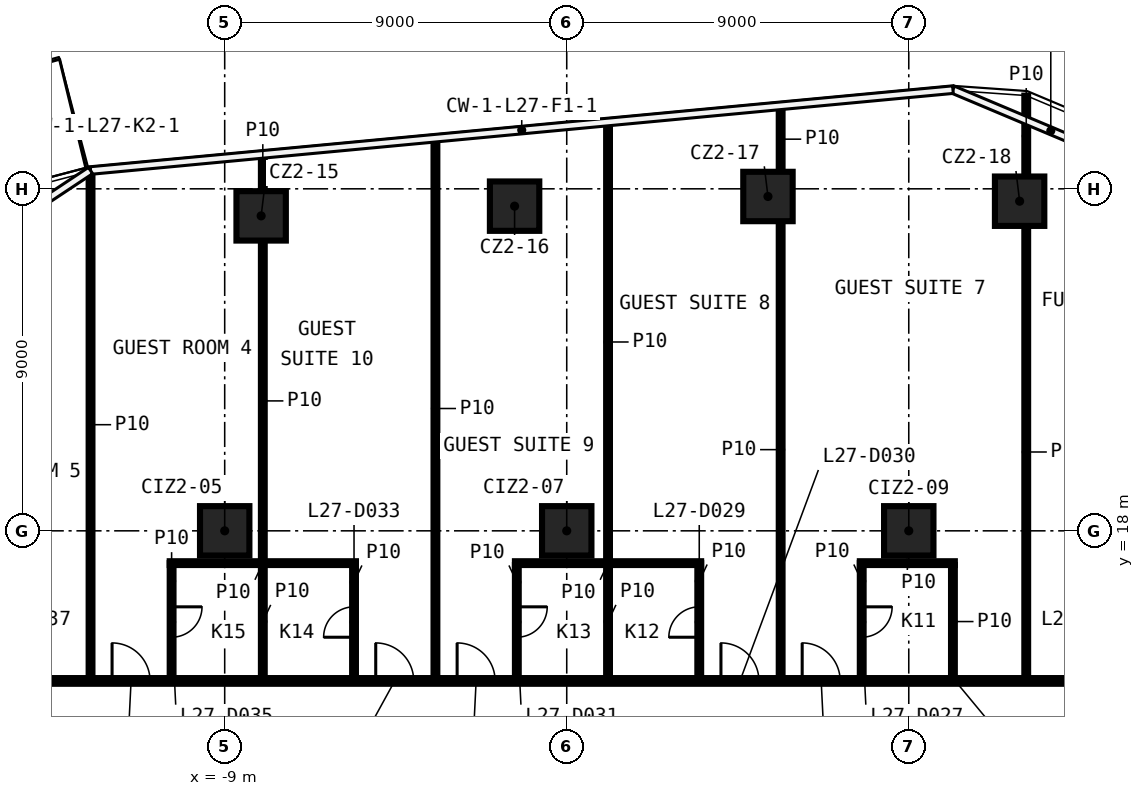
"""IFC4 building model, lengths in metres.
Left out: names, types, materials, properties, quantities, classifications, styles, units other than length and angle.
Written with IfcOpenShell. Run it as: python <this file> out.ifc"""

import sys

from ifc_helpers import new_model, si_unit, direction, frame, frame_2d, origin, origin_2d, place, context, subcontext, project, spatial, rectangle, extrude, element, fill, save


model = new_model("IFC4")
c1 = context("Model", 3, precision=1e-05, world=origin(), true_north=direction((0.0, 1.0)))
c2 = subcontext(c1, "Body", "Model", "MODEL_VIEW")
j1 = project(units=[si_unit("LENGTHUNIT", "METRE"), si_unit("PLANEANGLEUNIT", "RADIAN")], contexts=[c1])
p1 = place(None, origin())
s1 = spatial("IfcSite", under=j1, at=p1, CompositionType="ELEMENT")
p2 = place(p1, origin())
s2 = spatial("IfcBuilding", under=s1, at=p2, CompositionType="ELEMENT")
p3 = place(p2, frame((0.0, 0.0, 124.8)))
s3 = spatial("IfcBuildingStorey", under=s2, at=p3, CompositionType="ELEMENT", Elevation=124.8)
for number, where, z_axis, x_axis in (
    (1, (-8.041, 26.288, 0.0), (0.0, 0.0, 1.0), (1.0, 0.0, 0.0)),
    (2, (-1.372, 26.544, 0.0), (0.0, 0.0, 1.0), (1.0, 0.0, 0.0)),
    (3, (5.295, 26.798, 0.0), (0.0, 0.0, 1.0), (1.0, 0.0, 0.0)),
    (4, (11.917, 26.674, 0.0), (0.0, 0.0, 1.0), (1.0, 0.0, 0.0)),
    (5, (-9.0, 18.0, 0.0), (0.0, 0.0, 1.0), (1.0, 0.0, 0.0)),
    (6, (0.0, 18.0, 0.0), (0.0, 0.0, 1.0), (1.0, 0.0, 0.0)),
    (7, (9.0, 18.0, 0.0), (0.0, 0.0, 1.0), (1.0, 0.0, 0.0)),
):
    element("IfcColumn", number, at=place(p3, frame(where, z_axis=z_axis, x_axis=x_axis)), inside=s3, PredefinedType="COLUMN", context=c2, shape_type="SweptSolid", body=[
        extrude(rectangle(XDim=1.3, YDim=1.3, at=origin_2d()), origin(), (0.0, 0.0, 1.0), 3.3),
    ])
p4 = place(p3, frame((-17.125, 14.05, 0.0), z_axis=(0.0, 0.0, 1.0), x_axis=(1.0, 0.0, 0.0)))
e8 = element("IfcWall", 8, at=p4, inside=s3, PredefinedType="PARTITIONING", context=c2, shape_type="SweptSolid", body=[
    extrude(rectangle(XDim=34.25, YDim=0.15, at=frame_2d((17.125, 0.0))), origin(), (0.0, 0.0, 1.0), 3.3),
])
p5 = place(p4, frame((30.377, 0.0, 0.0)))
e9 = element("IfcOpeningElement", 9, at=p5, cuts=e8, PredefinedType="OPENING", context=c2, shape_type="SweptSolid", body=[
    extrude(rectangle(XDim=0.9, YDim=2.1, at=frame_2d((0.45, 1.05))), frame((0.0, 0.085, 0.0), z_axis=(0.0, -1.0, 0.0), x_axis=(1.0, 0.0, 0.0)), (0.0, 0.0, 1.0), 0.17),
])
p6 = place(p4, frame((23.321, 0.0, 0.0)))
e10 = element("IfcOpeningElement", 10, at=p6, cuts=e8, PredefinedType="OPENING", context=c2, shape_type="SweptSolid", body=[
    extrude(rectangle(XDim=1.0, YDim=2.1, at=frame_2d((0.5, 1.05))), frame((0.0, 0.085, 0.0), z_axis=(0.0, -1.0, 0.0), x_axis=(1.0, 0.0, 0.0)), (0.0, 0.0, 1.0), 0.17),
])
p7 = place(p4, frame((21.183, 0.0, 0.0)))
e11 = element("IfcOpeningElement", 11, at=p7, cuts=e8, PredefinedType="OPENING", context=c2, shape_type="SweptSolid", body=[
    extrude(rectangle(XDim=1.0, YDim=2.1, at=frame_2d((0.5, 1.05))), frame((0.0, 0.085, 0.0), z_axis=(0.0, -1.0, 0.0), x_axis=(1.0, 0.0, 0.0)), (0.0, 0.0, 1.0), 0.17),
])
p8 = place(p4, frame((14.241, 0.0, 0.0)))
e12 = element("IfcOpeningElement", 12, at=p8, cuts=e8, PredefinedType="OPENING", context=c2, shape_type="SweptSolid", body=[
    extrude(rectangle(XDim=1.0, YDim=2.1, at=frame_2d((0.5, 1.05))), frame((0.0, 0.085, 0.0), z_axis=(0.0, -1.0, 0.0), x_axis=(1.0, 0.0, 0.0)), (0.0, 0.0, 1.0), 0.17),
])
p9 = place(p4, frame((12.099, 0.0, 0.0)))
e13 = element("IfcOpeningElement", 13, at=p9, cuts=e8, PredefinedType="OPENING", context=c2, shape_type="SweptSolid", body=[
    extrude(rectangle(XDim=1.0, YDim=2.1, at=frame_2d((0.5, 1.05))), frame((0.0, 0.085, 0.0), z_axis=(0.0, -1.0, 0.0), x_axis=(1.0, 0.0, 0.0)), (0.0, 0.0, 1.0), 0.17),
])
p10 = place(p4, frame((5.161, 0.0, 0.0)))
e14 = element("IfcOpeningElement", 14, at=p10, cuts=e8, PredefinedType="OPENING", context=c2, shape_type="SweptSolid", body=[
    extrude(rectangle(XDim=1.0, YDim=2.1, at=frame_2d((0.5, 1.05))), frame((0.0, 0.085, 0.0), z_axis=(0.0, -1.0, 0.0), x_axis=(1.0, 0.0, 0.0)), (0.0, 0.0, 1.0), 0.17),
])
p11 = place(p4, frame((2.406, 0.0, 0.0)))
e15 = element("IfcOpeningElement", 15, at=p11, cuts=e8, PredefinedType="OPENING", context=c2, shape_type="SweptSolid", body=[
    extrude(rectangle(XDim=0.9, YDim=2.1, at=frame_2d((0.45, 1.05))), frame((0.0, 0.085, 0.0), z_axis=(0.0, -1.0, 0.0), x_axis=(1.0, 0.0, 0.0)), (0.0, 0.0, 1.0), 0.17),
])
p12 = place(p3, frame((-10.447, 17.15, 0.0), z_axis=(0.0, 0.0, 1.0), x_axis=(1.0, 0.0, 0.0)))
e16 = element("IfcWall", 16, at=p12, inside=s3, PredefinedType="PARTITIONING", context=c2, shape_type="SweptSolid", body=[
    extrude(rectangle(XDim=4.9, YDim=0.1, at=frame_2d((2.45, 0.0))), origin(), (0.0, 0.0, 1.0), 3.3),
])
p13 = place(p3, frame((-1.363, 17.15, 0.0), z_axis=(0.0, 0.0, 1.0), x_axis=(1.0, 0.0, 0.0)))
e17 = element("IfcWall", 17, at=p13, inside=s3, PredefinedType="PARTITIONING", context=c2, shape_type="SweptSolid", body=[
    extrude(rectangle(XDim=4.9, YDim=0.1, at=frame_2d((2.45, 0.0))), origin(), (0.0, 0.0, 1.0), 3.3),
])
p14 = place(p3, frame((7.712, 17.15, 0.0), z_axis=(0.0, 0.0, 1.0), x_axis=(1.0, 0.0, 0.0)))
e18 = element("IfcWall", 18, at=p14, inside=s3, PredefinedType="PARTITIONING", context=c2, shape_type="SweptSolid", body=[
    extrude(rectangle(XDim=2.5, YDim=0.1, at=frame_2d((1.25, 0.0))), origin(), (0.0, 0.0, 1.0), 3.3),
])
p15 = place(p3, frame((12.091, 14.125, 0.0), z_axis=(0.0, 0.0, 1.0), x_axis=(0.0, 1.0, 0.0)))
e19 = element("IfcWall", 19, at=p15, inside=s3, PredefinedType="PARTITIONING", context=c2, shape_type="SweptSolid", body=[
    extrude(rectangle(XDim=11.899, YDim=0.1, at=frame_2d((5.949, 0.0))), origin(), (0.0, 0.0, 1.0), 3.3),
])
p16 = place(p3, frame((12.091, 27.324, 0.0), z_axis=(0.0, 0.0, 1.0), x_axis=(0.0, 1.0, 0.0)))
e20 = element("IfcWall", 20, at=p16, inside=s3, PredefinedType="PARTITIONING", context=c2, shape_type="SweptSolid", body=[
    extrude(rectangle(XDim=2.128, YDim=0.1, at=frame_2d((1.064, 0.0))), origin(), (0.0, 0.0, 1.0), 3.3),
])
p17 = place(p3, frame((10.162, 14.125, 0.0), z_axis=(0.0, 0.0, 1.0), x_axis=(0.0, 1.0, 0.0)))
e21 = element("IfcWall", 21, at=p17, inside=s3, PredefinedType="PARTITIONING", context=c2, shape_type="SweptSolid", body=[
    extrude(rectangle(XDim=2.975, YDim=0.1, at=frame_2d((1.488, 0.0))), origin(), (0.0, 0.0, 1.0), 3.3),
])
p18 = place(p3, frame((7.762, 17.15, 0.0), z_axis=(0.0, 0.0, 1.0), x_axis=(0.0, -1.0, 0.0)))
e22 = element("IfcWall", 22, at=p18, inside=s3, PredefinedType="PARTITIONING", context=c2, shape_type="SweptSolid", body=[
    extrude(rectangle(XDim=3.025, YDim=0.1, at=frame_2d((1.512, 0.0))), origin(), (0.0, 0.0, 1.0), 3.3),
])
p19 = place(p18, frame((1.15, 0.0, 0.0)))
e23 = element("IfcOpeningElement", 23, at=p19, cuts=e22, PredefinedType="OPENING", context=c2, shape_type="SweptSolid", body=[
    extrude(rectangle(XDim=0.8, YDim=2.1, at=frame_2d((0.4, 1.05))), frame((0.0, 0.06, 0.0), z_axis=(0.0, -1.0, 0.0), x_axis=(1.0, 0.0, 0.0)), (0.0, 0.0, 1.0), 0.12),
])
p20 = place(p3, frame((5.629, 14.125, 0.0), z_axis=(0.0, 0.0, 1.0), x_axis=(0.0, 1.0, 0.0)))
e24 = element("IfcWall", 24, at=p20, inside=s3, PredefinedType="PARTITIONING", context=c2, shape_type="SweptSolid", body=[
    extrude(rectangle(XDim=12.023, YDim=0.1, at=frame_2d((6.011, 0.0))), origin(), (0.0, 0.0, 1.0), 3.3),
])
p21 = place(p3, frame((5.629, 27.448, 0.0), z_axis=(0.0, 0.0, 1.0), x_axis=(0.0, 1.0, 0.0)))
e25 = element("IfcWall", 25, at=p21, inside=s3, PredefinedType="PARTITIONING", context=c2, shape_type="SweptSolid", body=[
    extrude(rectangle(XDim=1.717, YDim=0.1, at=frame_2d((0.858, 0.0))), origin(), (0.0, 0.0, 1.0), 3.3),
])
p22 = place(p3, frame((3.487, 14.125, 0.0), z_axis=(0.0, 0.0, 1.0), x_axis=(0.0, 1.0, 0.0)))
e26 = element("IfcWall", 26, at=p22, inside=s3, PredefinedType="PARTITIONING", context=c2, shape_type="SweptSolid", body=[
    extrude(rectangle(XDim=3.025, YDim=0.1, at=frame_2d((1.512, 0.0))), origin(), (0.0, 0.0, 1.0), 3.3),
])
p23 = place(p22, frame((1.075, 0.0, 0.0)))
e27 = element("IfcOpeningElement", 27, at=p23, cuts=e26, PredefinedType="OPENING", context=c2, shape_type="SweptSolid", body=[
    extrude(rectangle(XDim=0.8, YDim=2.1, at=frame_2d((0.4, 1.05))), frame((0.0, 0.06, 0.0), z_axis=(0.0, -1.0, 0.0), x_axis=(1.0, 0.0, 0.0)), (0.0, 0.0, 1.0), 0.12),
])
p24 = place(p3, frame((1.087, 14.125, 0.0), z_axis=(0.0, 0.0, 1.0), x_axis=(0.0, 1.0, 0.0)))
e28 = element("IfcWall", 28, at=p24, inside=s3, PredefinedType="PARTITIONING", context=c2, shape_type="SweptSolid", body=[
    extrude(rectangle(XDim=2.975, YDim=0.1, at=frame_2d((1.488, 0.0))), origin(), (0.0, 0.0, 1.0), 3.3),
])
p25 = place(p3, frame((1.087, 17.2, 0.0), z_axis=(0.0, 0.0, 1.0), x_axis=(0.0, 1.0, 0.0)))
e29 = element("IfcWall", 29, at=p25, inside=s3, PredefinedType="PARTITIONING", context=c2, shape_type="SweptSolid", body=[
    extrude(rectangle(XDim=11.539, YDim=0.1, at=frame_2d((5.77, 0.0))), origin(), (0.0, 0.0, 1.0), 3.3),
])
p26 = place(p3, frame((-1.313, 17.1, 0.0), z_axis=(0.0, 0.0, 1.0), x_axis=(0.0, -1.0, 0.0)))
e30 = element("IfcWall", 30, at=p26, inside=s3, PredefinedType="PARTITIONING", context=c2, shape_type="SweptSolid", body=[
    extrude(rectangle(XDim=2.975, YDim=0.1, at=frame_2d((1.488, 0.0))), origin(), (0.0, 0.0, 1.0), 3.3),
])
p27 = place(p26, frame((1.1, 0.0, 0.0)))
e31 = element("IfcOpeningElement", 31, at=p27, cuts=e30, PredefinedType="OPENING", context=c2, shape_type="SweptSolid", body=[
    extrude(rectangle(XDim=0.8, YDim=2.1, at=frame_2d((0.4, 1.05))), frame((0.0, 0.06, 0.0), z_axis=(0.0, -1.0, 0.0), x_axis=(1.0, 0.0, 0.0)), (0.0, 0.0, 1.0), 0.12),
])
p28 = place(p3, frame((-3.455, 14.125, 0.0), z_axis=(0.0, 0.0, 1.0), x_axis=(0.0, 1.0, 0.0)))
e32 = element("IfcWall", 32, at=p28, inside=s3, PredefinedType="PARTITIONING", context=c2, shape_type="SweptSolid", body=[
    extrude(rectangle(XDim=14.188, YDim=0.1, at=frame_2d((7.094, 0.0))), origin(), (0.0, 0.0, 1.0), 3.3),
])
p29 = place(p3, frame((-5.597, 14.125, 0.0), z_axis=(0.0, 0.0, 1.0), x_axis=(0.0, 1.0, 0.0)))
e33 = element("IfcWall", 33, at=p29, inside=s3, PredefinedType="PARTITIONING", context=c2, shape_type="SweptSolid", body=[
    extrude(rectangle(XDim=2.975, YDim=0.1, at=frame_2d((1.488, 0.0))), origin(), (0.0, 0.0, 1.0), 3.3),
])
p30 = place(p29, frame((1.075, 0.0, 0.0)))
e34 = element("IfcOpeningElement", 34, at=p30, cuts=e33, PredefinedType="OPENING", context=c2, shape_type="SweptSolid", body=[
    extrude(rectangle(XDim=0.8, YDim=2.1, at=frame_2d((0.4, 1.05))), frame((0.0, 0.06, 0.0), z_axis=(0.0, -1.0, 0.0), x_axis=(1.0, 0.0, 0.0)), (0.0, 0.0, 1.0), 0.12),
])
p31 = place(p3, frame((-7.997, 14.125, 0.0), z_axis=(0.0, 0.0, 1.0), x_axis=(0.0, 1.0, 0.0)))
e35 = element("IfcWall", 35, at=p31, inside=s3, PredefinedType="PARTITIONING", context=c2, shape_type="SweptSolid", body=[
    extrude(rectangle(XDim=2.975, YDim=0.1, at=frame_2d((1.488, 0.0))), origin(), (0.0, 0.0, 1.0), 3.3),
])
p32 = place(p3, frame((-7.997, 17.2, 0.0), z_axis=(0.0, 0.0, 1.0), x_axis=(0.0, 1.0, 0.0)))
e36 = element("IfcWall", 36, at=p32, inside=s3, PredefinedType="PARTITIONING", context=c2, shape_type="SweptSolid", body=[
    extrude(rectangle(XDim=8.438, YDim=0.1, at=frame_2d((4.219, 0.0))), origin(), (0.0, 0.0, 1.0), 3.3),
])
p33 = place(p3, frame((-7.997, 26.938, 0.0), z_axis=(0.0, 0.0, 1.0), x_axis=(0.0, 1.0, 0.0)))
e37 = element("IfcWall", 37, at=p33, inside=s3, PredefinedType="PARTITIONING", context=c2, shape_type="SweptSolid", body=[
    extrude(rectangle(XDim=0.949, YDim=0.1, at=frame_2d((0.474, 0.0))), origin(), (0.0, 0.0, 1.0), 3.3),
])
p34 = place(p3, frame((-10.397, 17.15, 0.0), z_axis=(0.0, 0.0, 1.0), x_axis=(0.0, -1.0, 0.0)))
e38 = element("IfcWall", 38, at=p34, inside=s3, PredefinedType="PARTITIONING", context=c2, shape_type="SweptSolid", body=[
    extrude(rectangle(XDim=3.025, YDim=0.1, at=frame_2d((1.512, 0.0))), origin(), (0.0, 0.0, 1.0), 3.3),
])
p35 = place(p34, frame((1.15, 0.0, 0.0)))
e39 = element("IfcOpeningElement", 39, at=p35, cuts=e38, PredefinedType="OPENING", context=c2, shape_type="SweptSolid", body=[
    extrude(rectangle(XDim=0.8, YDim=2.1, at=frame_2d((0.4, 1.05))), frame((0.0, 0.06, 0.0), z_axis=(0.0, -1.0, 0.0), x_axis=(1.0, 0.0, 0.0)), (0.0, 0.0, 1.0), 0.12),
])
p36 = place(p3, frame((-12.53, 14.125, 0.0), z_axis=(0.0, 0.0, 1.0), x_axis=(0.0, 1.0, 0.0)))
e40 = element("IfcWall", 40, at=p36, inside=s3, PredefinedType="PARTITIONING", context=c2, shape_type="SweptSolid", body=[
    extrude(rectangle(XDim=13.336, YDim=0.1, at=frame_2d((6.668, 0.0))), origin(), (0.0, 0.0, 1.0), 3.3),
])
p37 = place(p19, origin())
e41 = element("IfcDoor", 41, at=p37, inside=s3, OperationType="SINGLE_SWING_LEFT", PredefinedType="DOOR", context=c2, shape_type="SweptSolid", body=[
    extrude(rectangle(XDim=0.8, YDim=2.1, at=frame_2d((0.4, 1.05))), frame((0.0, 0.025, 0.0), z_axis=(0.0, -1.0, 0.0), x_axis=(1.0, 0.0, 0.0)), (0.0, 0.0, 1.0), 0.05),
])
fill(e23, e41)
p38 = place(p6, origin())
e42 = element("IfcDoor", 42, at=p38, inside=s3, OperationType="SINGLE_SWING_RIGHT", PredefinedType="DOOR", context=c2, shape_type="SweptSolid", body=[
    extrude(rectangle(XDim=1.0, YDim=2.1, at=frame_2d((0.5, 1.05))), frame((0.0, 0.025, 0.0), z_axis=(0.0, -1.0, 0.0), x_axis=(1.0, 0.0, 0.0)), (0.0, 0.0, 1.0), 0.05),
])
fill(e10, e42)
p39 = place(p23, origin())
e43 = element("IfcDoor", 43, at=p39, inside=s3, OperationType="SINGLE_SWING_RIGHT", PredefinedType="DOOR", context=c2, shape_type="SweptSolid", body=[
    extrude(rectangle(XDim=0.8, YDim=2.1, at=frame_2d((0.4, 1.05))), frame((0.0, 0.025, 0.0), z_axis=(0.0, -1.0, 0.0), x_axis=(1.0, 0.0, 0.0)), (0.0, 0.0, 1.0), 0.05),
])
fill(e27, e43)
p40 = place(p7, origin())
e44 = element("IfcDoor", 44, at=p40, inside=s3, OperationType="SINGLE_SWING_LEFT", PredefinedType="DOOR", context=c2, shape_type="SweptSolid", body=[
    extrude(rectangle(XDim=1.0, YDim=2.1, at=frame_2d((0.5, 1.05))), frame((0.0, 0.025, 0.0), z_axis=(0.0, -1.0, 0.0), x_axis=(1.0, 0.0, 0.0)), (0.0, 0.0, 1.0), 0.05),
])
fill(e11, e44)
p41 = place(p27, origin())
e45 = element("IfcDoor", 45, at=p41, inside=s3, OperationType="SINGLE_SWING_LEFT", PredefinedType="DOOR", context=c2, shape_type="SweptSolid", body=[
    extrude(rectangle(XDim=0.8, YDim=2.1, at=frame_2d((0.4, 1.05))), frame((0.0, 0.025, 0.0), z_axis=(0.0, -1.0, 0.0), x_axis=(1.0, 0.0, 0.0)), (0.0, 0.0, 1.0), 0.05),
])
fill(e31, e45)
p42 = place(p8, origin())
e46 = element("IfcDoor", 46, at=p42, inside=s3, OperationType="SINGLE_SWING_RIGHT", PredefinedType="DOOR", context=c2, shape_type="SweptSolid", body=[
    extrude(rectangle(XDim=1.0, YDim=2.1, at=frame_2d((0.5, 1.05))), frame((0.0, 0.025, 0.0), z_axis=(0.0, -1.0, 0.0), x_axis=(1.0, 0.0, 0.0)), (0.0, 0.0, 1.0), 0.05),
])
fill(e12, e46)
p43 = place(p30, origin())
e47 = element("IfcDoor", 47, at=p43, inside=s3, OperationType="SINGLE_SWING_RIGHT", PredefinedType="DOOR", context=c2, shape_type="SweptSolid", body=[
    extrude(rectangle(XDim=0.8, YDim=2.1, at=frame_2d((0.4, 1.05))), frame((0.0, 0.025, 0.0), z_axis=(0.0, -1.0, 0.0), x_axis=(1.0, 0.0, 0.0)), (0.0, 0.0, 1.0), 0.05),
])
fill(e34, e47)
p44 = place(p9, origin())
e48 = element("IfcDoor", 48, at=p44, inside=s3, OperationType="SINGLE_SWING_LEFT", PredefinedType="DOOR", context=c2, shape_type="SweptSolid", body=[
    extrude(rectangle(XDim=1.0, YDim=2.1, at=frame_2d((0.5, 1.05))), frame((0.0, 0.025, 0.0), z_axis=(0.0, -1.0, 0.0), x_axis=(1.0, 0.0, 0.0)), (0.0, 0.0, 1.0), 0.05),
])
fill(e13, e48)
p45 = place(p35, origin())
e49 = element("IfcDoor", 49, at=p45, inside=s3, OperationType="SINGLE_SWING_LEFT", PredefinedType="DOOR", context=c2, shape_type="SweptSolid", body=[
    extrude(rectangle(XDim=0.8, YDim=2.1, at=frame_2d((0.4, 1.05))), frame((0.0, 0.025, 0.0), z_axis=(0.0, -1.0, 0.0), x_axis=(1.0, 0.0, 0.0)), (0.0, 0.0, 1.0), 0.05),
])
fill(e39, e49)
p46 = place(p10, origin())
e50 = element("IfcDoor", 50, at=p46, inside=s3, OperationType="SINGLE_SWING_RIGHT", PredefinedType="DOOR", context=c2, shape_type="SweptSolid", body=[
    extrude(rectangle(XDim=1.0, YDim=2.1, at=frame_2d((0.5, 1.05))), frame((0.0, 0.025, 0.0), z_axis=(0.0, -1.0, 0.0), x_axis=(1.0, 0.0, 0.0)), (0.0, 0.0, 1.0), 0.05),
])
fill(e14, e50)
save(model, sys.argv[1])
